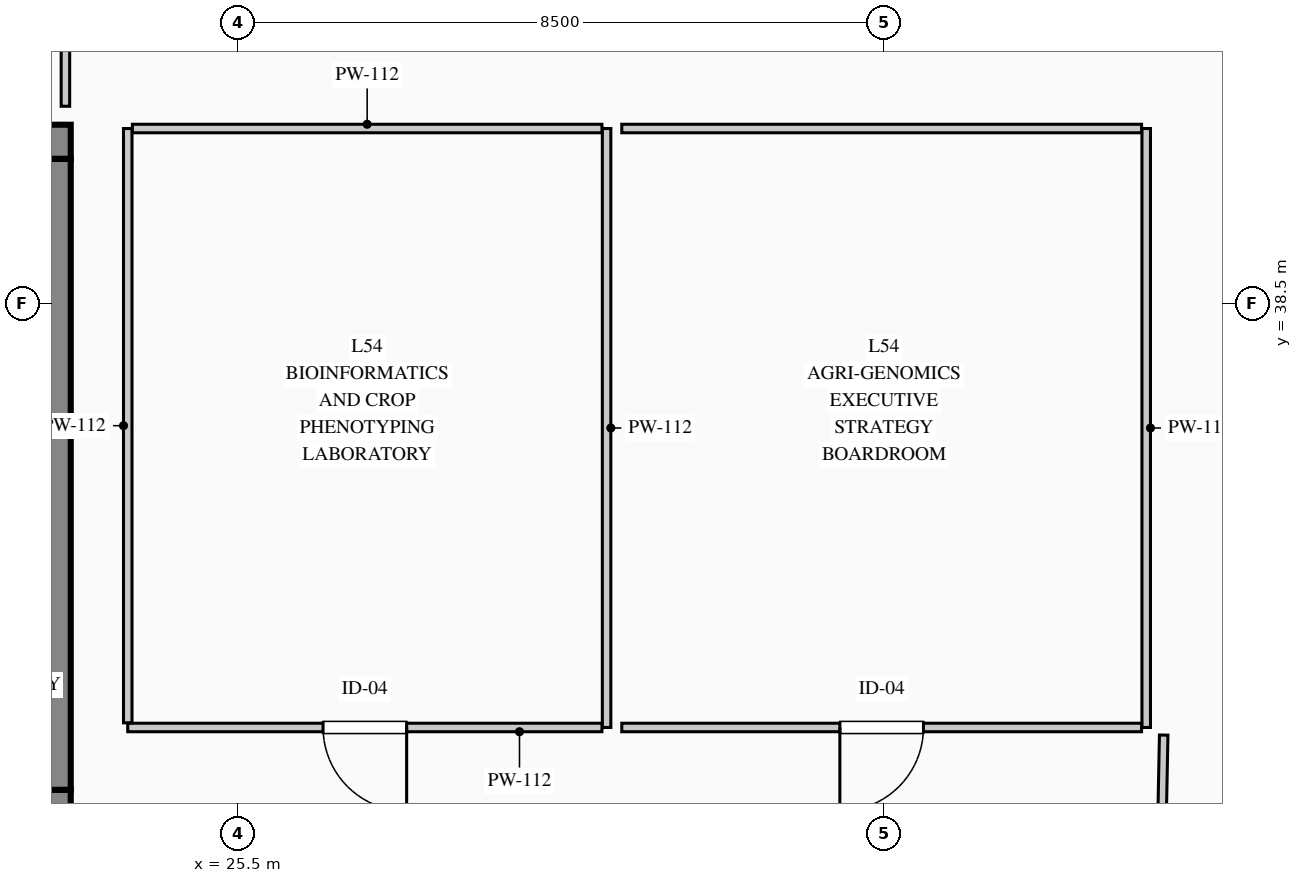
"""IFC4 building model, lengths in metres.
Left out: names, types, materials, properties, quantities, classifications, styles, units other than length and angle.
Written with IfcOpenShell. Run it as: python <this file> out.ifc"""

import sys

from ifc_helpers import new_model, si_unit, direction, frame, frame_2d, origin, place, context, subcontext, project, spatial, rectangle, extrude, element, fill, save


model = new_model("IFC4")
c1 = context("Model", 3, precision=1e-05, world=origin(), true_north=direction((0.0, 1.0)))
c2 = subcontext(c1, "Body", "Model", "MODEL_VIEW")
j1 = project(units=[si_unit("LENGTHUNIT", "METRE"), si_unit("PLANEANGLEUNIT", "RADIAN")], contexts=[c1])
p1 = place(None, origin())
s1 = spatial("IfcSite", under=j1, at=p1, CompositionType="ELEMENT")
p2 = place(p1, origin())
s2 = spatial("IfcBuilding", under=s1, at=p2, CompositionType="ELEMENT")
p3 = place(p2, frame((0.0, 0.0, 227.2)))
s3 = spatial("IfcBuildingStorey", under=s2, at=p3, CompositionType="ELEMENT", Elevation=227.2)
p4 = place(p3, frame((5.55, 40.625, 0.0), z_axis=(0.0, 0.0, 1.0), x_axis=(1.0, 0.0, 0.0)))
e1 = element("IfcWall", 1, at=p4, inside=s3, PredefinedType="SHEAR", context=c2, shape_type="SweptSolid", body=[
    extrude(rectangle(XDim=17.75, YDim=0.45, at=frame_2d((8.875, 0.0))), origin(), (0.0, 0.0, 1.0), 3.95),
])
p5 = place(p4, frame((15.895, 0.0, 0.0)))
e2 = element("IfcOpeningElement", 2, at=p5, cuts=e1, PredefinedType="OPENING", context=c2, shape_type="SweptSolid", body=[
    extrude(rectangle(XDim=1.18, YDim=2.25, at=frame_2d((0.59, 1.125))), frame((0.0, 0.235, 0.0), z_axis=(0.0, -1.0, 0.0), x_axis=(1.0, 0.0, 0.0)), (0.0, 0.0, 1.0), 0.47),
])
p6 = place(p3, frame((5.55, 31.875, 0.0), z_axis=(0.0, 0.0, 1.0), x_axis=(1.0, 0.0, 0.0)))
e3 = element("IfcWall", 3, at=p6, inside=s3, PredefinedType="SHEAR", context=c2, shape_type="SweptSolid", body=[
    extrude(rectangle(XDim=17.75, YDim=0.45, at=frame_2d((8.875, 0.0))), origin(), (0.0, 0.0, 1.0), 3.95),
])
p7 = place(p6, frame((3.1, 0.0, 0.0)))
e4 = element("IfcOpeningElement", 4, at=p7, cuts=e3, PredefinedType="OPENING", context=c2, shape_type="SweptSolid", body=[
    extrude(rectangle(XDim=1.2, YDim=2.2, at=frame_2d((0.6, 1.1))), frame((0.0, 0.235, 0.0), z_axis=(0.0, -1.0, 0.0), x_axis=(1.0, 0.0, 0.0)), (0.0, 0.0, 1.0), 0.47),
])
p8 = place(p6, frame((6.95, 0.0, 0.0)))
e5 = element("IfcOpeningElement", 5, at=p8, cuts=e3, PredefinedType="OPENING", context=c2, shape_type="SweptSolid", body=[
    extrude(rectangle(XDim=1.2, YDim=2.2, at=frame_2d((0.6, 1.1))), frame((0.0, 0.235, 0.0), z_axis=(0.0, -1.0, 0.0), x_axis=(1.0, 0.0, 0.0)), (0.0, 0.0, 1.0), 0.47),
])
p9 = place(p6, frame((8.8, 0.0, 0.0)))
e6 = element("IfcOpeningElement", 6, at=p9, cuts=e3, PredefinedType="OPENING", context=c2, shape_type="SweptSolid", body=[
    extrude(rectangle(XDim=1.15, YDim=2.2, at=frame_2d((0.575, 1.1))), frame((0.0, 0.235, 0.0), z_axis=(0.0, -1.0, 0.0), x_axis=(1.0, 0.0, 0.0)), (0.0, 0.0, 1.0), 0.47),
])
p10 = place(p6, frame((15.9, 0.0, 0.0)))
e7 = element("IfcOpeningElement", 7, at=p10, cuts=e3, PredefinedType="OPENING", context=c2, shape_type="SweptSolid", body=[
    extrude(rectangle(XDim=1.2, YDim=2.2, at=frame_2d((0.6, 1.1))), frame((0.0, 0.235, 0.0), z_axis=(0.0, -1.0, 0.0), x_axis=(1.0, 0.0, 0.0)), (0.0, 0.0, 1.0), 0.47),
])
p11 = place(p3, frame((23.075, 32.1, 0.0), z_axis=(0.0, 0.0, 1.0), x_axis=(0.0, 1.0, 0.0)))
e8 = element("IfcWall", 8, at=p11, inside=s3, PredefinedType="SHEAR", context=c2, shape_type="SweptSolid", body=[
    extrude(rectangle(XDim=8.3, YDim=0.45, at=frame_2d((4.15, 0.0))), origin(), (0.0, 0.0, 1.0), 3.95),
])
p12 = place(p3, frame((30.35, 40.8, 0.0), z_axis=(0.0, 0.0, 1.0), x_axis=(0.0, -1.0, 0.0)))
e9 = element("IfcWall", 9, at=p12, inside=s3, PredefinedType="PARTITIONING", context=c2, shape_type="SweptSolid", body=[
    extrude(rectangle(XDim=7.88, YDim=0.112, at=frame_2d((3.94, 0.0))), origin(), (0.0, 0.0, 1.0), 3.7),
])
p13 = place(p3, frame((30.289, 32.92, 0.0), z_axis=(0.0, 0.0, 1.0), x_axis=(-1.0, 0.0, 0.0)))
e10 = element("IfcWall", 10, at=p13, inside=s3, PredefinedType="PARTITIONING", context=c2, shape_type="SweptSolid", body=[
    extrude(rectangle(XDim=6.239, YDim=0.112, at=frame_2d((3.12, 0.0))), origin(), (0.0, 0.0, 1.0), 3.7),
])
p14 = place(p13, frame((2.57, 0.0, 0.0)))
e11 = element("IfcOpeningElement", 11, at=p14, cuts=e10, PredefinedType="OPENING", context=c2, shape_type="SweptSolid", body=[
    extrude(rectangle(XDim=1.1, YDim=2.2, at=frame_2d((0.55, 1.1))), frame((0.0, 0.066, 0.0), z_axis=(0.0, -1.0, 0.0), x_axis=(1.0, 0.0, 0.0)), (0.0, 0.0, 1.0), 0.132),
])
p15 = place(p3, frame((24.05, 32.981, 0.0), z_axis=(0.0, 0.0, 1.0), x_axis=(0.0, 1.0, 0.0)))
e12 = element("IfcWall", 12, at=p15, inside=s3, PredefinedType="PARTITIONING", context=c2, shape_type="SweptSolid", body=[
    extrude(rectangle(XDim=7.819, YDim=0.112, at=frame_2d((3.91, 0.0))), origin(), (0.0, 0.0, 1.0), 3.7),
])
p16 = place(p3, frame((24.111, 40.8, 0.0), z_axis=(0.0, 0.0, 1.0), x_axis=(1.0, 0.0, 0.0)))
e13 = element("IfcWall", 13, at=p16, inside=s3, PredefinedType="PARTITIONING", context=c2, shape_type="SweptSolid", body=[
    extrude(rectangle(XDim=6.178, YDim=0.112, at=frame_2d((3.089, 0.0))), origin(), (0.0, 0.0, 1.0), 3.7),
])
p17 = place(p3, frame((37.45, 40.8, 0.0), z_axis=(0.0, 0.0, 1.0), x_axis=(0.0, -1.0, 0.0)))
e14 = element("IfcWall", 14, at=p17, inside=s3, PredefinedType="PARTITIONING", context=c2, shape_type="SweptSolid", body=[
    extrude(rectangle(XDim=7.88, YDim=0.112, at=frame_2d((3.94, 0.0))), origin(), (0.0, 0.0, 1.0), 3.7),
])
p18 = place(p3, frame((37.389, 32.92, 0.0), z_axis=(0.0, 0.0, 1.0), x_axis=(-1.0, 0.0, 0.0)))
e15 = element("IfcWall", 15, at=p18, inside=s3, PredefinedType="PARTITIONING", context=c2, shape_type="SweptSolid", body=[
    extrude(rectangle(XDim=6.839, YDim=0.112, at=frame_2d((3.419, 0.0))), origin(), (0.0, 0.0, 1.0), 3.7),
])
p19 = place(p18, frame((2.869, 0.0, 0.0)))
e16 = element("IfcOpeningElement", 16, at=p19, cuts=e15, PredefinedType="OPENING", context=c2, shape_type="SweptSolid", body=[
    extrude(rectangle(XDim=1.1, YDim=2.2, at=frame_2d((0.55, 1.1))), frame((0.0, 0.066, 0.0), z_axis=(0.0, -1.0, 0.0), x_axis=(1.0, 0.0, 0.0)), (0.0, 0.0, 1.0), 0.132),
])
p20 = place(p3, frame((30.55, 40.8, 0.0), z_axis=(0.0, 0.0, 1.0), x_axis=(1.0, 0.0, 0.0)))
e17 = element("IfcWall", 17, at=p20, inside=s3, PredefinedType="PARTITIONING", context=c2, shape_type="SweptSolid", body=[
    extrude(rectangle(XDim=6.839, YDim=0.112, at=frame_2d((3.419, 0.0))), origin(), (0.0, 0.0, 1.0), 3.7),
])
p21 = place(p3, frame((37.599, 28.691, 0.0), z_axis=(0.0, 0.0, 1.0), x_axis=(0.019566997539, 0.999808547977, 0.0)))
e18 = element("IfcWall", 18, at=p21, inside=s3, PredefinedType="PARTITIONING", context=c2, shape_type="SweptSolid", body=[
    extrude(rectangle(XDim=4.13, YDim=0.112, at=frame_2d((2.065, 0.0))), origin(), (0.0, 0.0, 1.0), 3.7),
])
p22 = place(p21, frame((1.515, 0.0, 0.0)))
e19 = element("IfcOpeningElement", 19, at=p22, cuts=e18, PredefinedType="OPENING", context=c2, shape_type="SweptSolid", body=[
    extrude(rectangle(XDim=1.1, YDim=2.2, at=frame_2d((0.55, 1.1))), frame((0.0, 0.066, 0.0), z_axis=(0.0, -1.0, 0.0), x_axis=(1.0, 0.0, 0.0)), (0.0, 0.0, 1.0), 0.132),
])
p23 = place(p3, frame((23.23, 41.093, 0.0), z_axis=(0.0, 0.0, 1.0), x_axis=(0.0, 1.0, 0.0)))
e20 = element("IfcWall", 20, at=p23, inside=s3, PredefinedType="PARTITIONING", context=c2, shape_type="SweptSolid", body=[
    extrude(rectangle(XDim=2.162, YDim=0.112, at=frame_2d((1.081, 0.0))), origin(), (0.0, 0.0, 1.0), 3.7),
])
p24 = place(p14, origin())
e21 = element("IfcDoor", 21, at=p24, inside=s3, OperationType="SINGLE_SWING_LEFT", PredefinedType="DOOR", context=c2, shape_type="SweptSolid", body=[
    extrude(rectangle(XDim=1.1, YDim=2.2, at=frame_2d((0.55, 1.1))), frame((0.0, 0.025, 0.0), z_axis=(0.0, -1.0, 0.0), x_axis=(1.0, 0.0, 0.0)), (0.0, 0.0, 1.0), 0.05),
])
fill(e11, e21)
p25 = place(p19, origin())
e22 = element("IfcDoor", 22, at=p25, inside=s3, OperationType="SINGLE_SWING_RIGHT", PredefinedType="DOOR", context=c2, shape_type="SweptSolid", body=[
    extrude(rectangle(XDim=1.1, YDim=2.2, at=frame_2d((0.55, 1.1))), frame((0.0, 0.025, 0.0), z_axis=(0.0, -1.0, 0.0), x_axis=(1.0, 0.0, 0.0)), (0.0, 0.0, 1.0), 0.05),
])
fill(e16, e22)
save(model, sys.argv[1])
